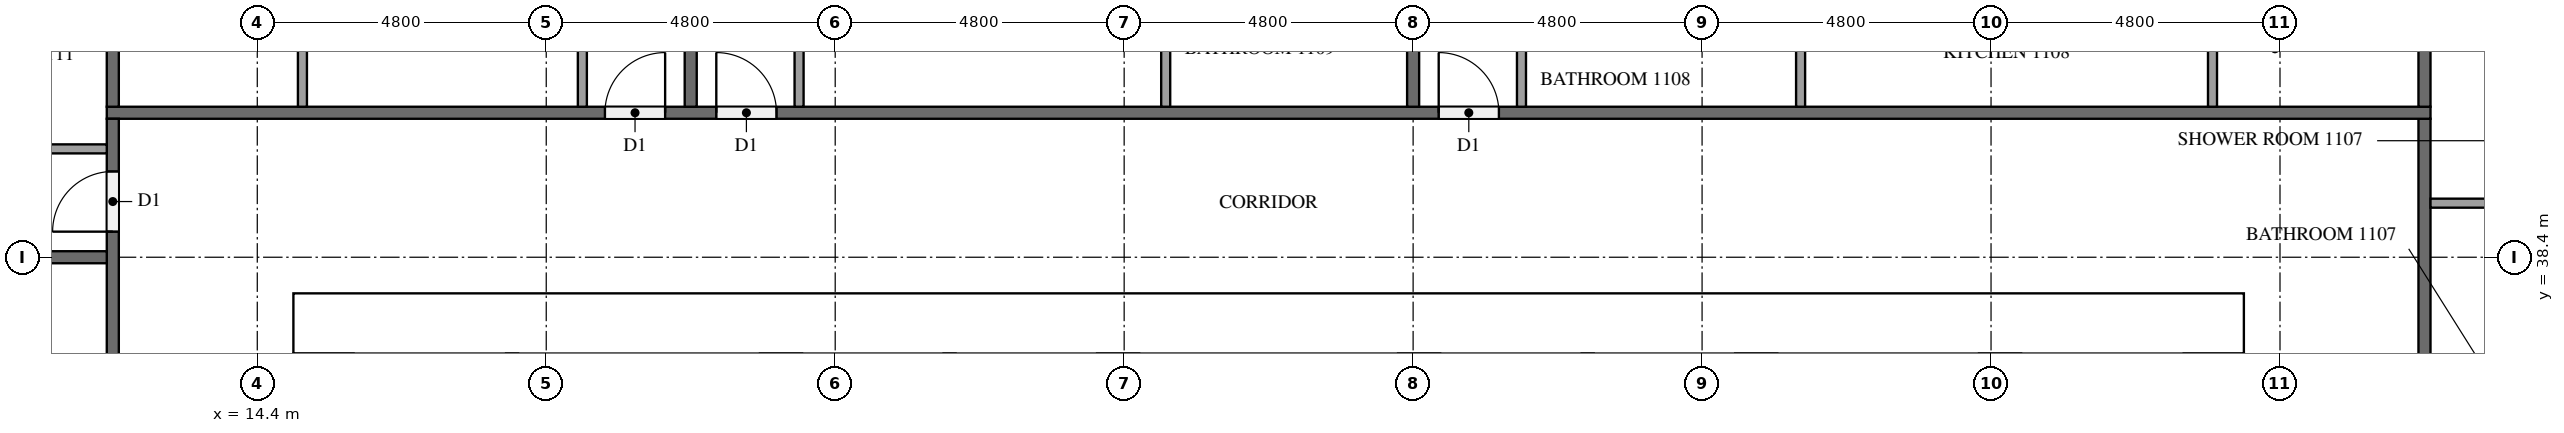
"""IFC4 building model, lengths in metres.
Left out: names, types, materials, properties, quantities, classifications, styles, units other than length and angle.
Written with IfcOpenShell. Run it as: python <this file> out.ifc"""

import sys

from ifc_helpers import new_model, si_unit, direction, frame, frame_2d, origin, place, context, subcontext, project, spatial, rectangle, extrude, element, fill, save


model = new_model("IFC4")
c1 = context("Model", 3, precision=1e-05, world=origin(), true_north=direction((0.0, 1.0)))
c2 = subcontext(c1, "Body", "Model", "MODEL_VIEW")
j1 = project(units=[si_unit("LENGTHUNIT", "METRE"), si_unit("PLANEANGLEUNIT", "RADIAN")], contexts=[c1])
p1 = place(None, origin())
s1 = spatial("IfcSite", under=j1, at=p1, CompositionType="ELEMENT")
p2 = place(p1, origin())
s2 = spatial("IfcBuilding", under=s1, at=p2, CompositionType="ELEMENT")
p3 = place(p2, frame((0.0, 0.0, 46.9)))
s3 = spatial("IfcBuildingStorey", under=s2, at=p3, CompositionType="ELEMENT", Elevation=46.9)
p4 = place(p3, frame((15.0, 37.3, 0.0), z_axis=(0.0, 0.0, 1.0), x_axis=(1.0, 0.0, 0.0)))
e1 = element("IfcWall", 1, at=p4, inside=s3, PredefinedType="SHEAR", context=c2, shape_type="SweptSolid", body=[
    extrude(rectangle(XDim=32.4, YDim=1.0, at=frame_2d((16.2, 0.0))), origin(), (0.0, 0.0, 1.0), 3.2),
])
p5 = place(p4, frame((15.3, 0.0, 0.0)))
e2 = element("IfcOpeningElement", 2, at=p5, cuts=e1, PredefinedType="OPENING", context=c2, shape_type="SweptSolid", body=[
    extrude(rectangle(XDim=1.8, YDim=2.1, at=frame_2d((0.9, 1.05))), frame((0.0, 0.51, 0.0), z_axis=(0.0, -1.0, 0.0), x_axis=(1.0, 0.0, 0.0)), (0.0, 0.0, 1.0), 1.02),
])
p6 = place(p4, frame((1.766, 0.0, 0.0)))
e3 = element("IfcOpeningElement", 3, at=p6, cuts=e1, PredefinedType="OPENING", context=c2, shape_type="SweptSolid", body=[
    extrude(rectangle(XDim=1.0, YDim=2.1, at=frame_2d((0.5, 1.05))), frame((0.0, 0.51, 0.0), z_axis=(0.0, -1.0, 0.0), x_axis=(1.0, 0.0, 0.0)), (0.0, 0.0, 1.0), 1.02),
])
p7 = place(p4, frame((5.241, 0.0, 0.0)))
e4 = element("IfcOpeningElement", 4, at=p7, cuts=e1, PredefinedType="OPENING", context=c2, shape_type="SweptSolid", body=[
    extrude(rectangle(XDim=1.0, YDim=2.1, at=frame_2d((0.5, 1.05))), frame((0.0, 0.51, 0.0), z_axis=(0.0, -1.0, 0.0), x_axis=(1.0, 0.0, 0.0)), (0.0, 0.0, 1.0), 1.02),
])
for number, where, z_axis, x_axis in (
    (5, (28.7, 33.9, 0.0), (0.0, 0.0, 1.0), (0.0, 1.0, 0.0)),
    (6, (33.7, 33.9, 0.0), (0.0, 0.0, 1.0), (0.0, 1.0, 0.0)),
):
    element("IfcWall", number, at=place(p3, frame(where, z_axis=z_axis, x_axis=x_axis)), inside=s3, PredefinedType="SHEAR", context=c2, shape_type="SweptSolid", body=[
        extrude(rectangle(XDim=2.9, YDim=0.7, at=frame_2d((1.45, 0.0))), origin(), (0.0, 0.0, 1.0), 3.2),
    ])
for number, where, z_axis, x_axis in (
    (7, (25.9, 33.9, 0.0), (0.0, 0.0, 1.0), (0.0, 1.0, 0.0)),
    (8, (36.5, 33.9, 0.0), (0.0, 0.0, 1.0), (0.0, 1.0, 0.0)),
):
    element("IfcWall", number, at=place(p3, frame(where, z_axis=z_axis, x_axis=x_axis)), inside=s3, PredefinedType="SOLIDWALL", context=c2, shape_type="SweptSolid", body=[
        extrude(rectangle(XDim=2.9, YDim=0.2, at=frame_2d((1.45, 0.0))), origin(), (0.0, 0.0, 1.0), 3.2),
    ])
p8 = place(p3, frame((18.633, 31.6, 0.0), z_axis=(0.0, 0.0, 1.0), x_axis=(0.0, 1.0, 0.0)))
e9 = element("IfcWall", 9, at=p8, inside=s3, PredefinedType="PARTITIONING", context=c2, shape_type="SweptSolid", body=[
    extrude(rectangle(XDim=5.2, YDim=0.2, at=frame_2d((2.6, 0.0))), origin(), (0.0, 0.0, 1.0), 3.2),
])
p9 = place(p3, frame((50.4, 40.7, 0.0), z_axis=(0.0, 0.0, 1.0), x_axis=(0.0, -1.0, 0.0)))
e10 = element("IfcWall", 10, at=p9, inside=s3, PredefinedType="PARTITIONING", context=c2, shape_type="SweptSolid", body=[
    extrude(rectangle(XDim=28.6, YDim=0.2, at=frame_2d((14.3, 0.0))), origin(), (0.0, 0.0, 1.0), 3.2),
])
p10 = place(p9, frame((17.125, 0.0, 0.0)))
e11 = element("IfcOpeningElement", 11, at=p10, cuts=e10, PredefinedType="OPENING", context=c2, shape_type="SweptSolid", body=[
    extrude(rectangle(XDim=1.0, YDim=2.1, at=frame_2d((0.5, 1.05))), frame((0.0, 0.11, 0.0), z_axis=(0.0, -1.0, 0.0), x_axis=(1.0, 0.0, 0.0)), (0.0, 0.0, 1.0), 0.22),
])
p11 = place(p9, frame((15.275, 0.0, 0.0)))
e12 = element("IfcOpeningElement", 12, at=p11, cuts=e10, PredefinedType="OPENING", context=c2, shape_type="SweptSolid", body=[
    extrude(rectangle(XDim=1.0, YDim=2.1, at=frame_2d((0.5, 1.05))), frame((0.0, 0.11, 0.0), z_axis=(0.0, -1.0, 0.0), x_axis=(1.0, 0.0, 0.0)), (0.0, 0.0, 1.0), 0.22),
])
p12 = place(p9, frame((5.675, 0.0, 0.0)))
e13 = element("IfcOpeningElement", 13, at=p12, cuts=e10, PredefinedType="OPENING", context=c2, shape_type="SweptSolid", body=[
    extrude(rectangle(XDim=1.0, YDim=2.1, at=frame_2d((0.5, 1.05))), frame((0.0, 0.11, 0.0), z_axis=(0.0, -1.0, 0.0), x_axis=(1.0, 0.0, 0.0)), (0.0, 0.0, 1.0), 0.22),
])
p13 = place(p3, frame((11.9, 40.8, 0.0), z_axis=(0.0, 0.0, 1.0), x_axis=(1.0, 0.0, 0.0)))
e14 = element("IfcWall", 14, at=p13, inside=s3, PredefinedType="PARTITIONING", context=c2, shape_type="SweptSolid", body=[
    extrude(rectangle(XDim=38.6, YDim=0.2, at=frame_2d((19.3, 0.0))), origin(), (0.0, 0.0, 1.0), 3.2),
])
p14 = place(p13, frame((22.125, 0.0, 0.0)))
e15 = element("IfcOpeningElement", 15, at=p14, cuts=e14, PredefinedType="OPENING", context=c2, shape_type="SweptSolid", body=[
    extrude(rectangle(XDim=1.0, YDim=2.1, at=frame_2d((0.5, 1.05))), frame((0.0, 0.11, 0.0), z_axis=(0.0, -1.0, 0.0), x_axis=(1.0, 0.0, 0.0)), (0.0, 0.0, 1.0), 0.22),
])
p15 = place(p13, frame((10.125, 0.0, 0.0)))
e16 = element("IfcOpeningElement", 16, at=p15, cuts=e14, PredefinedType="OPENING", context=c2, shape_type="SweptSolid", body=[
    extrude(rectangle(XDim=1.0, YDim=2.1, at=frame_2d((0.5, 1.05))), frame((0.0, 0.11, 0.0), z_axis=(0.0, -1.0, 0.0), x_axis=(1.0, 0.0, 0.0)), (0.0, 0.0, 1.0), 0.22),
])
p16 = place(p13, frame((8.275, 0.0, 0.0)))
e17 = element("IfcOpeningElement", 17, at=p16, cuts=e14, PredefinedType="OPENING", context=c2, shape_type="SweptSolid", body=[
    extrude(rectangle(XDim=1.0, YDim=2.1, at=frame_2d((0.5, 1.05))), frame((0.0, 0.11, 0.0), z_axis=(0.0, -1.0, 0.0), x_axis=(1.0, 0.0, 0.0)), (0.0, 0.0, 1.0), 0.22),
])
p17 = place(p3, frame((12.0, 12.1, 0.0), z_axis=(0.0, 0.0, 1.0), x_axis=(0.0, 1.0, 0.0)))
e18 = element("IfcWall", 18, at=p17, inside=s3, PredefinedType="PARTITIONING", context=c2, shape_type="SweptSolid", body=[
    extrude(rectangle(XDim=28.6, YDim=0.2, at=frame_2d((14.3, 0.0))), origin(), (0.0, 0.0, 1.0), 3.2),
])
p18 = place(p17, frame((26.725, 0.0, 0.0)))
e19 = element("IfcOpeningElement", 19, at=p18, cuts=e18, PredefinedType="OPENING", context=c2, shape_type="SweptSolid", body=[
    extrude(rectangle(XDim=1.0, YDim=2.1, at=frame_2d((0.5, 1.05))), frame((0.0, 0.11, 0.0), z_axis=(0.0, -1.0, 0.0), x_axis=(1.0, 0.0, 0.0)), (0.0, 0.0, 1.0), 0.22),
])
p19 = place(p17, frame((17.125, 0.0, 0.0)))
e20 = element("IfcOpeningElement", 20, at=p19, cuts=e18, PredefinedType="OPENING", context=c2, shape_type="SweptSolid", body=[
    extrude(rectangle(XDim=1.0, YDim=2.1, at=frame_2d((0.5, 1.05))), frame((0.0, 0.11, 0.0), z_axis=(0.0, -1.0, 0.0), x_axis=(1.0, 0.0, 0.0)), (0.0, 0.0, 1.0), 0.22),
])
p20 = place(p17, frame((15.275, 0.0, 0.0)))
e21 = element("IfcOpeningElement", 21, at=p20, cuts=e18, PredefinedType="OPENING", context=c2, shape_type="SweptSolid", body=[
    extrude(rectangle(XDim=1.0, YDim=2.1, at=frame_2d((0.5, 1.05))), frame((0.0, 0.11, 0.0), z_axis=(0.0, -1.0, 0.0), x_axis=(1.0, 0.0, 0.0)), (0.0, 0.0, 1.0), 0.22),
])
p21 = place(p17, frame((5.675, 0.0, 0.0)))
e22 = element("IfcOpeningElement", 22, at=p21, cuts=e18, PredefinedType="OPENING", context=c2, shape_type="SweptSolid", body=[
    extrude(rectangle(XDim=1.0, YDim=2.1, at=frame_2d((0.5, 1.05))), frame((0.0, 0.11, 0.0), z_axis=(0.0, -1.0, 0.0), x_axis=(1.0, 0.0, 0.0)), (0.0, 0.0, 1.0), 0.22),
])
p22 = place(p3, frame((50.4, 40.9, 0.0), z_axis=(0.0, 0.0, 1.0), x_axis=(0.0, 1.0, 0.0)))
e23 = element("IfcWall", 23, at=p22, inside=s3, PredefinedType="PARTITIONING", context=c2, shape_type="SweptSolid", body=[
    extrude(rectangle(XDim=7.0, YDim=0.2, at=frame_2d((3.5, 0.0))), origin(), (0.0, 0.0, 1.0), 3.2),
])
p23 = place(p3, frame((33.6, 47.55, 0.0), z_axis=(0.0, 0.0, 1.0), x_axis=(0.0, -1.0, 0.0)))
e24 = element("IfcWall", 24, at=p23, inside=s3, PredefinedType="PARTITIONING", context=c2, shape_type="SweptSolid", body=[
    extrude(rectangle(XDim=6.65, YDim=0.2, at=frame_2d((3.325, 0.0))), origin(), (0.0, 0.0, 1.0), 3.2),
])
for number, where, z_axis, x_axis in (
    (25, (21.6, 47.9, 0.0), (0.0, 0.0, 1.0), (0.0, -1.0, 0.0)),
    (26, (12.0, 47.9, 0.0), (0.0, 0.0, 1.0), (0.0, -1.0, 0.0)),
):
    element("IfcWall", number, at=place(p3, frame(where, z_axis=z_axis, x_axis=x_axis)), inside=s3, PredefinedType="PARTITIONING", context=c2, shape_type="SweptSolid", body=[
        extrude(rectangle(XDim=7.0, YDim=0.2, at=frame_2d((3.5, 0.0))), origin(), (0.0, 0.0, 1.0), 3.2),
    ])
p24 = place(p3, frame((0.1, 38.4, 0.0), z_axis=(0.0, 0.0, 1.0), x_axis=(1.0, 0.0, 0.0)))
e27 = element("IfcWall", 27, at=p24, inside=s3, PredefinedType="PARTITIONING", context=c2, shape_type="SweptSolid", body=[
    extrude(rectangle(XDim=11.8, YDim=0.2, at=frame_2d((5.9, 0.0))), origin(), (0.0, 0.0, 1.0), 3.2),
])
p25 = place(p3, frame((50.5, 39.298, 0.0), z_axis=(0.0, 0.0, 1.0), x_axis=(1.0, 0.0, 0.0)))
e28 = element("IfcWall", 28, at=p25, inside=s3, PredefinedType="PARTITIONING", context=c2, shape_type="SweptSolid", body=[
    extrude(rectangle(XDim=1.925, YDim=0.15, at=frame_2d((0.962, 0.0))), origin(), (0.0, 0.0, 1.0), 3.2),
])
for number, where, z_axis, x_axis in (
    (29, (40.037, 40.9, 0.0), (0.0, 0.0, 1.0), (0.0, 1.0, 0.0)),
    (30, (46.879, 40.9, 0.0), (0.0, 0.0, 1.0), (0.0, 1.0, 0.0)),
):
    element("IfcWall", number, at=place(p3, frame(where, z_axis=z_axis, x_axis=x_axis)), inside=s3, PredefinedType="PARTITIONING", context=c2, shape_type="SweptSolid", body=[
        extrude(rectangle(XDim=1.775, YDim=0.15, at=frame_2d((0.888, 0.0))), origin(), (0.0, 0.0, 1.0), 3.2),
    ])
p26 = place(p3, frame((35.4, 40.9, 0.0), z_axis=(0.0, 0.0, 1.0), x_axis=(0.0, 1.0, 0.0)))
e31 = element("IfcWall", 31, at=p26, inside=s3, PredefinedType="PARTITIONING", context=c2, shape_type="SweptSolid", body=[
    extrude(rectangle(XDim=1.925, YDim=0.15, at=frame_2d((0.962, 0.0))), origin(), (0.0, 0.0, 1.0), 3.2),
])
p27 = place(p3, frame((29.49, 40.9, 0.0), z_axis=(0.0, 0.0, 1.0), x_axis=(0.0, 1.0, 0.0)))
e32 = element("IfcWall", 32, at=p27, inside=s3, PredefinedType="PARTITIONING", context=c2, shape_type="SweptSolid", body=[
    extrude(rectangle(XDim=2.225, YDim=0.15, at=frame_2d((1.113, 0.0))), origin(), (0.0, 0.0, 1.0), 3.2),
])
p28 = place(p3, frame((23.4, 40.9, 0.0), z_axis=(0.0, 0.0, 1.0), x_axis=(0.0, 1.0, 0.0)))
e33 = element("IfcWall", 33, at=p28, inside=s3, PredefinedType="PARTITIONING", context=c2, shape_type="SweptSolid", body=[
    extrude(rectangle(XDim=2.375, YDim=0.15, at=frame_2d((1.188, 0.0))), origin(), (0.0, 0.0, 1.0), 3.2),
])
p29 = place(p3, frame((15.15, 40.9, 0.0), z_axis=(0.0, 0.0, 1.0), x_axis=(0.0, 1.0, 0.0)))
e34 = element("IfcWall", 34, at=p29, inside=s3, PredefinedType="PARTITIONING", context=c2, shape_type="SweptSolid", body=[
    extrude(rectangle(XDim=2.075, YDim=0.15, at=frame_2d((1.038, 0.0))), origin(), (0.0, 0.0, 1.0), 3.2),
])
p30 = place(p3, frame((19.8, 40.9, 0.0), z_axis=(0.0, 0.0, 1.0), x_axis=(0.0, 1.0, 0.0)))
e35 = element("IfcWall", 35, at=p30, inside=s3, PredefinedType="PARTITIONING", context=c2, shape_type="SweptSolid", body=[
    extrude(rectangle(XDim=2.225, YDim=0.15, at=frame_2d((1.113, 0.0))), origin(), (0.0, 0.0, 1.0), 3.2),
])
p31 = place(p3, frame((11.9, 40.2, 0.0), z_axis=(0.0, 0.0, 1.0), x_axis=(-1.0, 0.0, 0.0)))
e36 = element("IfcWall", 36, at=p31, inside=s3, PredefinedType="PARTITIONING", context=c2, shape_type="SweptSolid", body=[
    extrude(rectangle(XDim=3.425, YDim=0.15, at=frame_2d((1.712, 0.0))), origin(), (0.0, 0.0, 1.0), 3.2),
])
p32 = place(p5, origin())
e37 = element("IfcDoor", 37, at=p32, inside=s3, OperationType="DOUBLE_DOOR_SINGLE_SWING", PredefinedType="DOOR", context=c2, shape_type="SweptSolid", body=[
    extrude(rectangle(XDim=1.8, YDim=2.1, at=frame_2d((0.9, 1.05))), frame((0.0, 0.025, 0.0), z_axis=(0.0, -1.0, 0.0), x_axis=(1.0, 0.0, 0.0)), (0.0, 0.0, 1.0), 0.05),
])
fill(e2, e37)
p33 = place(p6, origin())
e38 = element("IfcDoor", 38, at=p33, inside=s3, OperationType="SINGLE_SWING_RIGHT", PredefinedType="DOOR", context=c2, shape_type="SweptSolid", body=[
    extrude(rectangle(XDim=1.0, YDim=2.1, at=frame_2d((0.5, 1.05))), frame((0.0, 0.025, 0.0), z_axis=(0.0, -1.0, 0.0), x_axis=(1.0, 0.0, 0.0)), (0.0, 0.0, 1.0), 0.05),
])
fill(e3, e38)
p34 = place(p7, origin())
e39 = element("IfcDoor", 39, at=p34, inside=s3, OperationType="SINGLE_SWING_LEFT", PredefinedType="DOOR", context=c2, shape_type="SweptSolid", body=[
    extrude(rectangle(XDim=1.0, YDim=2.1, at=frame_2d((0.5, 1.05))), frame((0.0, 0.025, 0.0), z_axis=(0.0, -1.0, 0.0), x_axis=(1.0, 0.0, 0.0)), (0.0, 0.0, 1.0), 0.05),
])
fill(e4, e39)
p35 = place(p14, origin())
e40 = element("IfcDoor", 40, at=p35, inside=s3, OperationType="SINGLE_SWING_LEFT", PredefinedType="DOOR", context=c2, shape_type="SweptSolid", body=[
    extrude(rectangle(XDim=1.0, YDim=2.1, at=frame_2d((0.5, 1.05))), frame((0.0, 0.025, 0.0), z_axis=(0.0, -1.0, 0.0), x_axis=(1.0, 0.0, 0.0)), (0.0, 0.0, 1.0), 0.05),
])
fill(e15, e40)
p36 = place(p15, origin())
e41 = element("IfcDoor", 41, at=p36, inside=s3, OperationType="SINGLE_SWING_LEFT", PredefinedType="DOOR", context=c2, shape_type="SweptSolid", body=[
    extrude(rectangle(XDim=1.0, YDim=2.1, at=frame_2d((0.5, 1.05))), frame((0.0, 0.025, 0.0), z_axis=(0.0, -1.0, 0.0), x_axis=(1.0, 0.0, 0.0)), (0.0, 0.0, 1.0), 0.05),
])
fill(e16, e41)
p37 = place(p16, origin())
e42 = element("IfcDoor", 42, at=p37, inside=s3, OperationType="SINGLE_SWING_RIGHT", PredefinedType="DOOR", context=c2, shape_type="SweptSolid", body=[
    extrude(rectangle(XDim=1.0, YDim=2.1, at=frame_2d((0.5, 1.05))), frame((0.0, 0.025, 0.0), z_axis=(0.0, -1.0, 0.0), x_axis=(1.0, 0.0, 0.0)), (0.0, 0.0, 1.0), 0.05),
])
fill(e17, e42)
p38 = place(p18, origin())
e43 = element("IfcDoor", 43, at=p38, inside=s3, OperationType="SINGLE_SWING_LEFT", PredefinedType="DOOR", context=c2, shape_type="SweptSolid", body=[
    extrude(rectangle(XDim=1.0, YDim=2.1, at=frame_2d((0.5, 1.05))), frame((0.0, 0.025, 0.0), z_axis=(0.0, -1.0, 0.0), x_axis=(1.0, 0.0, 0.0)), (0.0, 0.0, 1.0), 0.05),
])
fill(e19, e43)
save(model, sys.argv[1])
